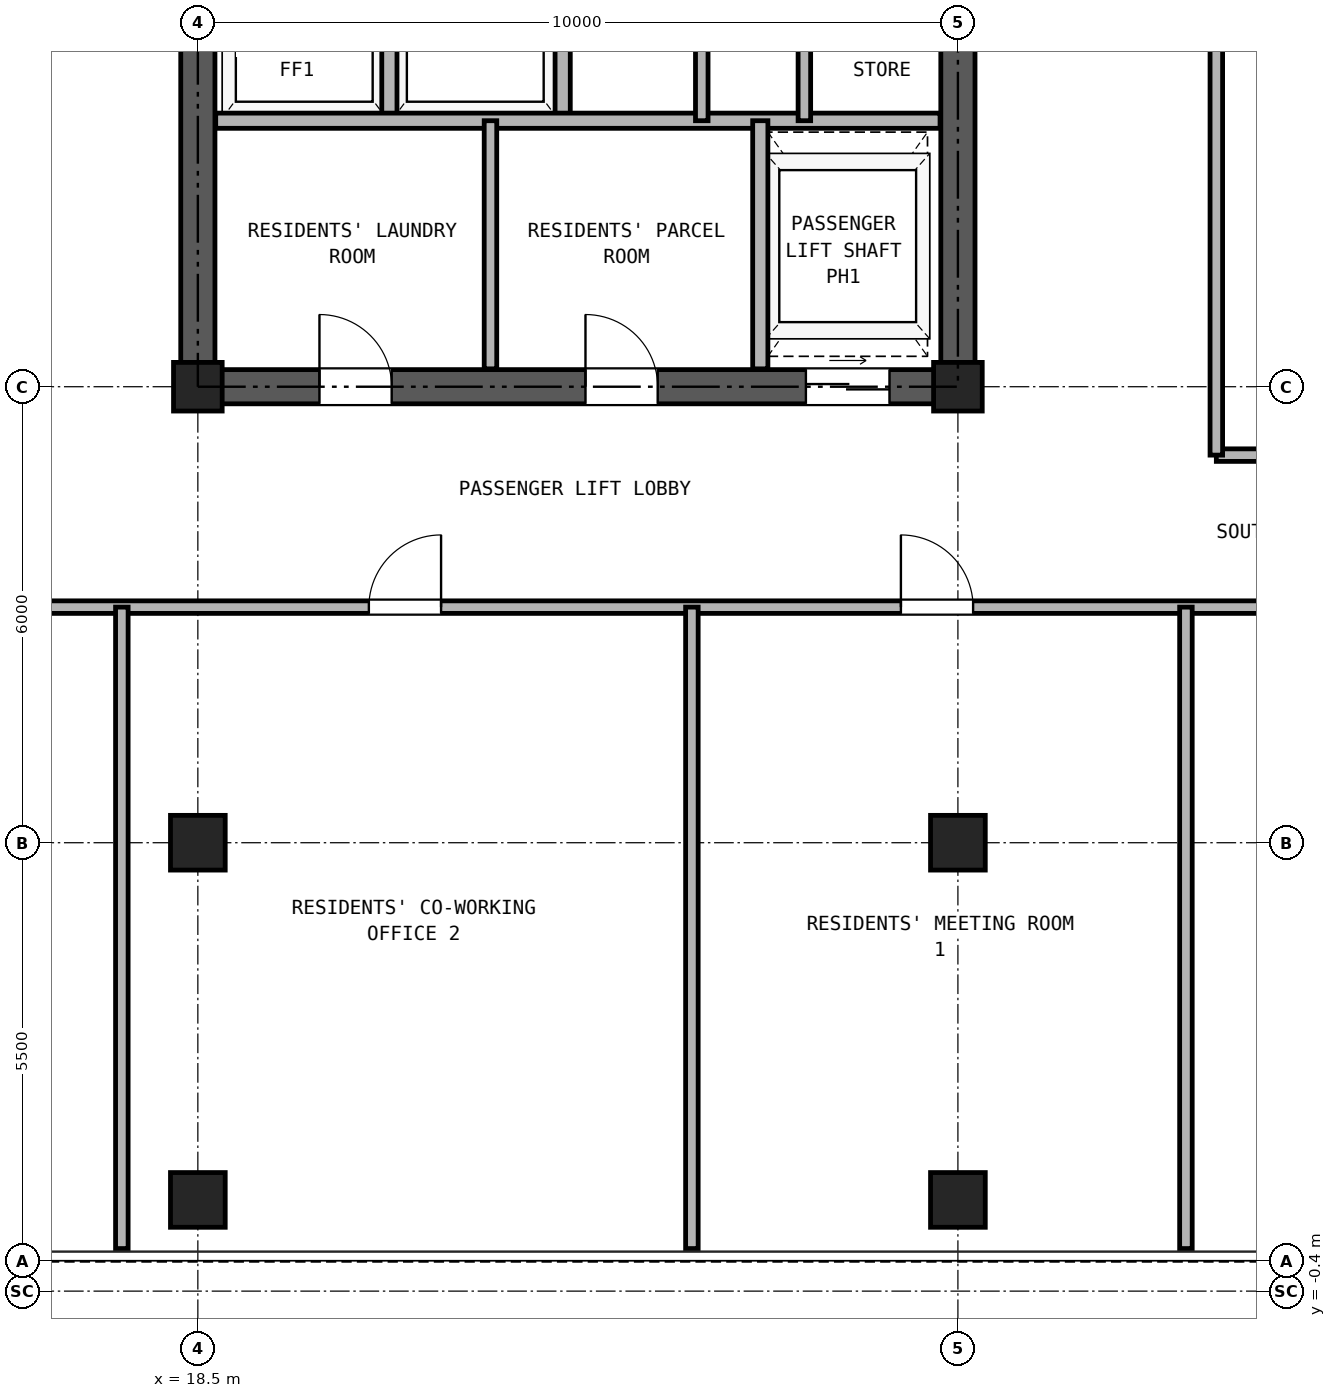
"""IFC4 building model, lengths in metres.
Left out: names, types, materials, properties, quantities, classifications, styles, units other than length and angle.
Written with IfcOpenShell. Run it as: python <this file> out.ifc"""

import sys

from ifc_helpers import new_model, si_unit, direction, frame, frame_2d, origin, origin_2d, place, context, subcontext, project, spatial, rectangle, hollow_rectangle, extrude, source, transform, mapped, element, fill, save


model = new_model("IFC4")
c1 = context("Model", 3, precision=1e-05, world=origin(), true_north=direction((0.0, 1.0)))
c2 = subcontext(c1, "Body", "Model", "MODEL_VIEW")
j1 = project(units=[si_unit("LENGTHUNIT", "METRE"), si_unit("PLANEANGLEUNIT", "RADIAN")], contexts=[c1])
p1 = place(None, origin())
s1 = spatial("IfcSite", under=j1, at=p1, CompositionType="ELEMENT")
p2 = place(p1, origin())
s2 = spatial("IfcBuilding", under=s1, at=p2, CompositionType="ELEMENT")
p3 = place(p2, frame((0.0, 0.0, 196.4)))
s3 = spatial("IfcBuildingStorey", under=s2, at=p3, CompositionType="ELEMENT", Elevation=196.4)
m1 = source(origin(), c2, "Body", "SweptSolid", [
    extrude(hollow_rectangle(XDim=0.72, YDim=0.72, WallThickness=0.04, at=origin_2d()), origin(), (0.0, 0.0, 1.0), 2.95),
])
for number, where, z_axis, x_axis in (
    (1, (18.5, 0.8, 0.0), (0.0, 0.0, 1.0), (1.0, 0.0, 0.0)),
    (2, (28.5, 0.8, 0.0), (0.0, 0.0, 1.0), (1.0, 0.0, 0.0)),
    (3, (18.5, 5.5, 0.0), (0.0, 0.0, 1.0), (1.0, 0.0, 0.0)),
):
    element("IfcColumn", number, at=place(p3, frame(where, z_axis=z_axis, x_axis=x_axis)), inside=s3, PredefinedType="COLUMN", context=c2, shape_type="MappedRepresentation", body=[
        mapped(m1, transform((0.0, 0.0, 0.0), x_axis=(1.0, 0.0, 0.0), y_axis=(0.0, 1.0, 0.0), z_axis=(0.0, 0.0, 1.0), scale=1.0)),
    ])
m2 = source(origin(), c2, "Body", "SweptSolid", [
    extrude(hollow_rectangle(XDim=0.64, YDim=0.64, WallThickness=0.035, at=origin_2d()), origin(), (0.0, 0.0, 1.0), 2.95),
])
p4 = place(p3, frame((18.5, 11.5, 0.0), z_axis=(0.0, 0.0, 1.0), x_axis=(1.0, 0.0, 0.0)))
e4 = element("IfcColumn", 4, at=p4, inside=s3, PredefinedType="COLUMN", context=c2, shape_type="MappedRepresentation", body=[
    mapped(m2, transform((0.0, 0.0, 0.0), x_axis=(1.0, 0.0, 0.0), y_axis=(0.0, 1.0, 0.0), z_axis=(0.0, 0.0, 1.0), scale=1.0)),
])
p5 = place(p3, frame((28.5, 5.5, 0.0), z_axis=(0.0, 0.0, 1.0), x_axis=(1.0, 0.0, 0.0)))
e5 = element("IfcColumn", 5, at=p5, inside=s3, PredefinedType="COLUMN", context=c2, shape_type="MappedRepresentation", body=[
    mapped(m1, transform((0.0, 0.0, 0.0), x_axis=(1.0, 0.0, 0.0), y_axis=(0.0, 1.0, 0.0), z_axis=(0.0, 0.0, 1.0), scale=1.0)),
])
p6 = place(p3, frame((28.5, 11.5, 0.0), z_axis=(0.0, 0.0, 1.0), x_axis=(1.0, 0.0, 0.0)))
e6 = element("IfcColumn", 6, at=p6, inside=s3, PredefinedType="COLUMN", context=c2, shape_type="MappedRepresentation", body=[
    mapped(m2, transform((0.0, 0.0, 0.0), x_axis=(1.0, 0.0, 0.0), y_axis=(0.0, 1.0, 0.0), z_axis=(0.0, 0.0, 1.0), scale=1.0)),
])
p7 = place(p3, frame((18.275, 11.5, 0.0), z_axis=(0.0, 0.0, 1.0), x_axis=(1.0, 0.0, 0.0)))
e7 = element("IfcWall", 7, at=p7, inside=s3, PredefinedType="SHEAR", context=c2, shape_type="SweptSolid", body=[
    extrude(rectangle(XDim=10.45, YDim=0.45, at=frame_2d((5.225, 0.0))), origin(), (0.0, 0.0, 1.0), 2.95),
])
p8 = place(p7, frame((1.825, 0.0, 0.0)))
e8 = element("IfcOpeningElement", 8, at=p8, cuts=e7, PredefinedType="OPENING", context=c2, shape_type="SweptSolid", body=[
    extrude(rectangle(XDim=0.95, YDim=2.15, at=frame_2d((0.475, 1.075))), frame((0.0, 0.235, 0.0), z_axis=(0.0, -1.0, 0.0), x_axis=(1.0, 0.0, 0.0)), (0.0, 0.0, 1.0), 0.47),
])
p9 = place(p7, frame((5.325, 0.0, 0.0)))
e9 = element("IfcOpeningElement", 9, at=p9, cuts=e7, PredefinedType="OPENING", context=c2, shape_type="SweptSolid", body=[
    extrude(rectangle(XDim=0.95, YDim=2.15, at=frame_2d((0.475, 1.075))), frame((0.0, 0.235, 0.0), z_axis=(0.0, -1.0, 0.0), x_axis=(1.0, 0.0, 0.0)), (0.0, 0.0, 1.0), 0.47),
])
p10 = place(p7, frame((8.225, 0.0, 0.0)))
e10 = element("IfcOpeningElement", 10, at=p10, cuts=e7, PredefinedType="OPENING", context=c2, shape_type="SweptSolid", body=[
    extrude(rectangle(XDim=1.1, YDim=2.25, at=frame_2d((0.55, 1.125))), frame((0.0, 0.235, 0.0), z_axis=(0.0, -1.0, 0.0), x_axis=(1.0, 0.0, 0.0)), (0.0, 0.0, 1.0), 0.47),
])
p11 = place(p3, frame((18.5, 11.725, 0.0), z_axis=(0.0, 0.0, 1.0), x_axis=(0.0, 1.0, 0.0)))
e11 = element("IfcWall", 11, at=p11, inside=s3, PredefinedType="SHEAR", context=c2, shape_type="SweptSolid", body=[
    extrude(rectangle(XDim=16.8, YDim=0.45, at=frame_2d((8.4, 0.0))), origin(), (0.0, 0.0, 1.0), 2.95),
])
p12 = place(p11, frame((7.425, 0.0, 0.0)))
e12 = element("IfcOpeningElement", 12, at=p12, cuts=e11, PredefinedType="OPENING", context=c2, shape_type="SweptSolid", body=[
    extrude(rectangle(XDim=1.15, YDim=2.2, at=frame_2d((0.575, 1.1))), frame((0.0, 0.235, 0.0), z_axis=(0.0, -1.0, 0.0), x_axis=(1.0, 0.0, 0.0)), (0.0, 0.0, 1.0), 0.47),
])
p13 = place(p3, frame((28.5, 11.725, 0.0), z_axis=(0.0, 0.0, 1.0), x_axis=(0.0, 1.0, 0.0)))
e13 = element("IfcWall", 13, at=p13, inside=s3, PredefinedType="SHEAR", context=c2, shape_type="SweptSolid", body=[
    extrude(rectangle(XDim=16.8, YDim=0.45, at=frame_2d((8.4, 0.0))), origin(), (0.0, 0.0, 1.0), 2.95),
])
p14 = place(p13, frame((7.425, 0.0, 0.0)))
e14 = element("IfcOpeningElement", 14, at=p14, cuts=e13, PredefinedType="OPENING", context=c2, shape_type="SweptSolid", body=[
    extrude(rectangle(XDim=1.15, YDim=2.2, at=frame_2d((0.575, 1.1))), frame((0.0, 0.235, 0.0), z_axis=(0.0, -1.0, 0.0), x_axis=(1.0, 0.0, 0.0)), (0.0, 0.0, 1.0), 0.47),
])
for number, where, z_axis, x_axis in (
    (15, (21.02, 15.0, 0.0), (0.0, 0.0, 1.0), (0.0, 1.0, 0.0)),
    (16, (23.3, 15.0, 0.0), (0.0, 0.0, 1.0), (0.0, 1.0, 0.0)),
):
    element("IfcWall", number, at=place(p3, frame(where, z_axis=z_axis, x_axis=x_axis)), inside=s3, PredefinedType="PARTITIONING", context=c2, shape_type="SweptSolid", body=[
        extrude(rectangle(XDim=3.0, YDim=0.2, at=frame_2d((1.5, 0.0))), origin(), (0.0, 0.0, 1.0), 2.95),
    ])
p15 = place(p3, frame((18.735, 15.0, 0.0), z_axis=(0.0, 0.0, 1.0), x_axis=(1.0, 0.0, 0.0)))
e17 = element("IfcWall", 17, at=p15, inside=s3, PredefinedType="PARTITIONING", context=c2, shape_type="SweptSolid", body=[
    extrude(rectangle(XDim=9.53, YDim=0.2, at=frame_2d((4.765, 0.0))), origin(), (0.0, 0.0, 1.0), 2.95),
])
p16 = place(p3, frame((25.13, 15.0, 0.0), z_axis=(0.0, 0.0, 1.0), x_axis=(0.0, 1.0, 0.0)))
e18 = element("IfcWall", 18, at=p16, inside=s3, PredefinedType="PARTITIONING", context=c2, shape_type="SweptSolid", body=[
    extrude(rectangle(XDim=3.0, YDim=0.165, at=frame_2d((1.5, 0.0))), origin(), (0.0, 0.0, 1.0), 2.95),
])
p17 = place(p3, frame((26.48, 15.0, 0.0), z_axis=(0.0, 0.0, 1.0), x_axis=(0.0, 1.0, 0.0)))
e19 = element("IfcWall", 19, at=p17, inside=s3, PredefinedType="PARTITIONING", context=c2, shape_type="SweptSolid", body=[
    extrude(rectangle(XDim=3.0, YDim=0.165, at=frame_2d((1.5, 0.0))), origin(), (0.0, 0.0, 1.0), 2.95),
])
p18 = place(p17, frame((1.05, 0.0, 0.0)))
e20 = element("IfcOpeningElement", 20, at=p18, cuts=e19, PredefinedType="OPENING", context=c2, shape_type="SweptSolid", body=[
    extrude(rectangle(XDim=0.9, YDim=2.05, at=frame_2d((0.45, 1.025))), frame((0.0, 0.093, 0.0), z_axis=(0.0, -1.0, 0.0), x_axis=(1.0, 0.0, 0.0)), (0.0, 0.0, 1.0), 0.185),
])
p19 = place(p3, frame((22.35, 11.735, 0.0), z_axis=(0.0, 0.0, 1.0), x_axis=(0.0, 1.0, 0.0)))
e21 = element("IfcWall", 21, at=p19, inside=s3, PredefinedType="PARTITIONING", context=c2, shape_type="SweptSolid", body=[
    extrude(rectangle(XDim=3.265, YDim=0.165, at=frame_2d((1.632, 0.0))), origin(), (0.0, 0.0, 1.0), 2.95),
])
p20 = place(p3, frame((25.9, 11.735, 0.0), z_axis=(0.0, 0.0, 1.0), x_axis=(0.0, 1.0, 0.0)))
e22 = element("IfcWall", 22, at=p20, inside=s3, PredefinedType="PARTITIONING", context=c2, shape_type="SweptSolid", body=[
    extrude(rectangle(XDim=3.265, YDim=0.2, at=frame_2d((1.632, 0.0))), origin(), (0.0, 0.0, 1.0), 2.95),
])
p21 = place(p3, frame((0.16, 8.6, 0.0), z_axis=(0.0, 0.0, 1.0), x_axis=(1.0, 0.0, 0.0)))
e23 = element("IfcWall", 23, at=p21, inside=s3, PredefinedType="PARTITIONING", context=c2, shape_type="SweptSolid", body=[
    extrude(rectangle(XDim=41.48, YDim=0.165, at=frame_2d((20.74, 0.0))), origin(), (0.0, 0.0, 1.0), 2.583),
])
p22 = place(p21, frame((11.89, 0.0, 0.0)))
e24 = element("IfcOpeningElement", 24, at=p22, cuts=e23, PredefinedType="OPENING", context=c2, shape_type="SweptSolid", body=[
    extrude(rectangle(XDim=0.95, YDim=2.15, at=frame_2d((0.475, 1.075))), frame((0.0, 0.093, 0.0), z_axis=(0.0, -1.0, 0.0), x_axis=(1.0, 0.0, 0.0)), (0.0, 0.0, 1.0), 0.185),
])
p23 = place(p21, frame((20.59, 0.0, 0.0)))
e25 = element("IfcOpeningElement", 25, at=p23, cuts=e23, PredefinedType="OPENING", context=c2, shape_type="SweptSolid", body=[
    extrude(rectangle(XDim=0.95, YDim=2.15, at=frame_2d((0.475, 1.075))), frame((0.0, 0.093, 0.0), z_axis=(0.0, -1.0, 0.0), x_axis=(1.0, 0.0, 0.0)), (0.0, 0.0, 1.0), 0.185),
])
p24 = place(p21, frame((27.59, 0.0, 0.0)))
e26 = element("IfcOpeningElement", 26, at=p24, cuts=e23, PredefinedType="OPENING", context=c2, shape_type="SweptSolid", body=[
    extrude(rectangle(XDim=0.95, YDim=2.15, at=frame_2d((0.475, 1.075))), frame((0.0, 0.093, 0.0), z_axis=(0.0, -1.0, 0.0), x_axis=(1.0, 0.0, 0.0)), (0.0, 0.0, 1.0), 0.185),
])
p25 = place(p21, frame((34.19, 0.0, 0.0)))
e27 = element("IfcOpeningElement", 27, at=p25, cuts=e23, PredefinedType="OPENING", context=c2, shape_type="SweptSolid", body=[
    extrude(rectangle(XDim=0.95, YDim=2.15, at=frame_2d((0.475, 1.075))), frame((0.0, 0.093, 0.0), z_axis=(0.0, -1.0, 0.0), x_axis=(1.0, 0.0, 0.0)), (0.0, 0.0, 1.0), 0.185),
])
p26 = place(p3, frame((31.9, 10.6, 0.0), z_axis=(0.0, 0.0, 1.0), x_axis=(1.0, 0.0, 0.0)))
e28 = element("IfcWall", 28, at=p26, inside=s3, PredefinedType="PARTITIONING", context=c2, shape_type="SweptSolid", body=[
    extrude(rectangle(XDim=6.3, YDim=0.165, at=frame_2d((3.15, 0.0))), origin(), (0.0, 0.0, 1.0), 2.95),
])
p27 = place(p3, frame((31.9, 10.6, 0.0), z_axis=(0.0, 0.0, 1.0), x_axis=(0.0, 1.0, 0.0)))
e29 = element("IfcWall", 29, at=p27, inside=s3, PredefinedType="PARTITIONING", context=c2, shape_type="SweptSolid", body=[
    extrude(rectangle(XDim=24.54, YDim=0.165, at=frame_2d((12.27, 0.0))), origin(), (0.0, 0.0, 1.0), 2.95),
])
p28 = place(p27, frame((5.95, 0.0, 0.0)))
e30 = element("IfcOpeningElement", 30, at=p28, cuts=e29, PredefinedType="OPENING", context=c2, shape_type="SweptSolid", body=[
    extrude(rectangle(XDim=1.0, YDim=2.15, at=frame_2d((0.5, 1.075))), frame((0.0, 0.093, 0.0), z_axis=(0.0, -1.0, 0.0), x_axis=(1.0, 0.0, 0.0)), (0.0, 0.0, 1.0), 0.185),
])
p29 = place(p27, frame((16.65, 0.0, 0.0)))
e31 = element("IfcOpeningElement", 31, at=p29, cuts=e29, PredefinedType="OPENING", context=c2, shape_type="SweptSolid", body=[
    extrude(rectangle(XDim=1.0, YDim=2.15, at=frame_2d((0.5, 1.075))), frame((0.0, 0.093, 0.0), z_axis=(0.0, -1.0, 0.0), x_axis=(1.0, 0.0, 0.0)), (0.0, 0.0, 1.0), 0.185),
])
for number, where, z_axis, x_axis in (
    (32, (17.5, 0.16, 0.0), (0.0, 0.0, 1.0), (0.0, 1.0, 0.0)),
    (33, (25.0, 0.16, 0.0), (0.0, 0.0, 1.0), (0.0, 1.0, 0.0)),
    (34, (31.5, 0.16, 0.0), (0.0, 0.0, 1.0), (0.0, 1.0, 0.0)),
):
    element("IfcWall", number, at=place(p3, frame(where, z_axis=z_axis, x_axis=x_axis)), inside=s3, PredefinedType="PARTITIONING", context=c2, shape_type="SweptSolid", body=[
        extrude(rectangle(XDim=8.44, YDim=0.165, at=frame_2d((4.22, 0.0))), origin(), (0.0, 0.0, 1.0), 2.95),
    ])
p30 = place(p8, frame((0.95, 0.0, 0.0), z_axis=(0.0, 0.0, 1.0), x_axis=(-1.0, 0.0, 0.0)))
e35 = element("IfcDoor", 35, at=p30, inside=s3, OperationType="SINGLE_SWING_LEFT", PredefinedType="DOOR", context=c2, shape_type="SweptSolid", body=[
    extrude(rectangle(XDim=0.95, YDim=2.15, at=frame_2d((0.475, 1.075))), frame((0.0, 0.025, 0.0), z_axis=(0.0, -1.0, 0.0), x_axis=(1.0, 0.0, 0.0)), (0.0, 0.0, 1.0), 0.05),
])
fill(e8, e35)
p31 = place(p9, frame((0.95, 0.0, 0.0), z_axis=(0.0, 0.0, 1.0), x_axis=(-1.0, 0.0, 0.0)))
e36 = element("IfcDoor", 36, at=p31, inside=s3, OperationType="SINGLE_SWING_LEFT", PredefinedType="DOOR", context=c2, shape_type="SweptSolid", body=[
    extrude(rectangle(XDim=0.95, YDim=2.15, at=frame_2d((0.475, 1.075))), frame((0.0, 0.025, 0.0), z_axis=(0.0, -1.0, 0.0), x_axis=(1.0, 0.0, 0.0)), (0.0, 0.0, 1.0), 0.05),
])
fill(e9, e36)
p32 = place(p10, frame((1.1, 0.0, 0.0), z_axis=(0.0, 0.0, 1.0), x_axis=(-1.0, 0.0, 0.0)))
e37 = element("IfcDoor", 37, at=p32, inside=s3, OperationType="DOUBLE_DOOR_SLIDING", PredefinedType="DOOR", context=c2, shape_type="SweptSolid", body=[
    extrude(rectangle(XDim=1.1, YDim=2.25, at=frame_2d((0.55, 1.125))), frame((0.0, 0.025, 0.0), z_axis=(0.0, -1.0, 0.0), x_axis=(1.0, 0.0, 0.0)), (0.0, 0.0, 1.0), 0.05),
])
fill(e10, e37)
p33 = place(p23, frame((0.95, 0.0, 0.0), z_axis=(0.0, 0.0, 1.0), x_axis=(-1.0, 0.0, 0.0)))
e38 = element("IfcDoor", 38, at=p33, inside=s3, OperationType="SINGLE_SWING_RIGHT", PredefinedType="DOOR", context=c2, shape_type="SweptSolid", body=[
    extrude(rectangle(XDim=0.95, YDim=2.15, at=frame_2d((0.475, 1.075))), frame((0.0, 0.025, 0.0), z_axis=(0.0, -1.0, 0.0), x_axis=(1.0, 0.0, 0.0)), (0.0, 0.0, 1.0), 0.05),
])
fill(e25, e38)
p34 = place(p24, frame((0.95, 0.0, 0.0), z_axis=(0.0, 0.0, 1.0), x_axis=(-1.0, 0.0, 0.0)))
e39 = element("IfcDoor", 39, at=p34, inside=s3, OperationType="SINGLE_SWING_LEFT", PredefinedType="DOOR", context=c2, shape_type="SweptSolid", body=[
    extrude(rectangle(XDim=0.95, YDim=2.15, at=frame_2d((0.475, 1.075))), frame((0.0, 0.025, 0.0), z_axis=(0.0, -1.0, 0.0), x_axis=(1.0, 0.0, 0.0)), (0.0, 0.0, 1.0), 0.05),
])
fill(e26, e39)
save(model, sys.argv[1])
